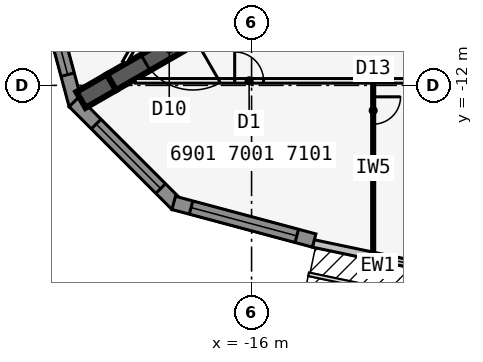
"""IFC4 building model, lengths in metres.
Left out: names, types, materials, properties, quantities, classifications, styles, units other than length and angle.
Written with IfcOpenShell. Run it as: python <this file> out.ifc"""

import sys

from ifc_helpers import new_model, si_unit, direction, frame, frame_2d, origin, place, context, subcontext, project, spatial, polyline, rectangle, outline, extrude, element, fill, save


model = new_model("IFC4")
c1 = context("Model", 3, precision=1e-05, world=origin(), true_north=direction((0.0, 1.0)))
c2 = subcontext(c1, "Body", "Model", "MODEL_VIEW")
j1 = project(units=[si_unit("LENGTHUNIT", "METRE"), si_unit("PLANEANGLEUNIT", "RADIAN")], contexts=[c1])
p1 = place(None, origin())
s1 = spatial("IfcSite", under=j1, at=p1, CompositionType="ELEMENT")
p2 = place(p1, origin())
s2 = spatial("IfcBuilding", under=s1, at=p2, CompositionType="ELEMENT")
p3 = place(p2, frame((0.0, 0.0, 260.9)))
s3 = spatial("IfcBuildingStorey", under=s2, at=p3, CompositionType="ELEMENT", Elevation=260.9)
p4 = place(p3, frame((-16.5, -9.526, 0.0), z_axis=(0.0, 0.0, 1.0), x_axis=(-0.866031398331, -0.499989616998, 0.0)))
e1 = element("IfcWall", 1, at=p4, inside=s3, PredefinedType="SHEAR", context=c2, shape_type="SweptSolid", body=[
    extrude(rectangle(XDim=4.746, YDim=0.6, at=frame_2d((2.373, 0.0))), origin(), (0.0, 0.0, 1.0), 3.6),
])
p5 = place(p4, frame((1.65, 0.0, 0.0)))
e2 = element("IfcOpeningElement", 2, at=p5, cuts=e1, PredefinedType="OPENING", context=c2, shape_type="SweptSolid", body=[
    extrude(rectangle(XDim=1.8, YDim=2.13, at=frame_2d((0.9, 1.065))), frame((0.0, 0.31, 0.0), z_axis=(0.0, -1.0, 0.0), x_axis=(1.0, 0.0, 0.0)), (0.0, 0.0, 1.0), 0.62),
])
p6 = place(p3, frame((-20.61, -11.899, 0.0), z_axis=(0.0, 0.0, 1.0), x_axis=(-0.866009537788, -0.500027479704, 0.0)))
e3 = element("IfcWall", 3, at=p6, inside=s3, PredefinedType="SHEAR", context=c2, shape_type="SweptSolid", body=[
    extrude(rectangle(XDim=1.155, YDim=0.6, at=frame_2d((0.577, 0.0))), origin(), (0.0, 0.0, 1.0), 3.6),
])
p7 = place(p3, frame((-13.974, -17.198, 0.0), z_axis=(0.0, 0.0, 1.0), x_axis=(0.978654320409, -0.205513311355, 0.0)))
e4 = element("IfcWall", 4, at=p7, inside=s3, PredefinedType="STANDARD", context=c2, shape_type="SweptSolid", body=[
    extrude(rectangle(XDim=7.153, YDim=0.25, at=frame_2d((3.576, 0.0))), origin(), (0.0, 0.0, 1.0), 3.435),
])
p8 = place(p7, frame((2.376, 0.0, 0.45)))
e5 = element("IfcOpeningElement", 5, at=p8, cuts=e4, PredefinedType="OPENING", context=c2, shape_type="SweptSolid", body=[
    extrude(rectangle(XDim=4.2, YDim=2.6, at=frame_2d((2.1, 1.3))), frame((0.0, 0.135, 0.0), z_axis=(0.0, -1.0, 0.0), x_axis=(1.0, 0.0, 0.0)), (0.0, 0.0, 1.0), 0.27),
])
p9 = place(p3, frame((-23.02, -8.025, 0.0), z_axis=(0.0, 0.0, 1.0), x_axis=(0.25880328844, -0.965930048136, 0.0)))
e6 = element("IfcWall", 6, at=p9, inside=s3, PredefinedType="SOLIDWALL", context=c2, shape_type="SweptSolid", body=[
    extrude(outline(polyline([(4.782, 0.225), (4.722, 0.225), (4.375, 0.132), (4.351, 0.225), (0.0, 0.225), (0.0, -0.225), (4.782, -0.225), (4.782, 0.225)])), origin(), (0.0, 0.0, 1.0), 3.435),
])
p10 = place(p9, frame((0.75, 0.0, 0.45)))
e7 = element("IfcOpeningElement", 7, at=p10, cuts=e6, PredefinedType="OPENING", context=c2, shape_type="SweptSolid", body=[
    extrude(rectangle(XDim=3.0, YDim=2.6, at=frame_2d((1.5, 1.3))), frame((0.0, 0.235, 0.0), z_axis=(0.0, -1.0, 0.0), x_axis=(1.0, 0.0, 0.0)), (0.0, 0.0, 1.0), 0.47),
])
p11 = place(p3, frame((-21.841, -12.542, 0.0), z_axis=(0.0, 0.0, 1.0), x_axis=(0.707081252484, -0.707132308968, 0.0)))
e8 = element("IfcWall", 8, at=p11, inside=s3, PredefinedType="SOLIDWALL", context=c2, shape_type="SweptSolid", body=[
    extrude(outline(polyline([(4.782, 0.225), (0.431, 0.225), (0.406, 0.132), (0.059, 0.225), (0.0, 0.225), (0.0, -0.225), (4.782, -0.225), (4.782, 0.225)])), origin(), (0.0, 0.0, 1.0), 3.435),
])
p12 = place(p11, frame((1.031, 0.0, 0.45)))
e9 = element("IfcOpeningElement", 9, at=p12, cuts=e8, PredefinedType="OPENING", context=c2, shape_type="SweptSolid", body=[
    extrude(rectangle(XDim=3.0, YDim=2.6, at=frame_2d((1.5, 1.3))), frame((0.0, 0.235, 0.0), z_axis=(0.0, -1.0, 0.0), x_axis=(1.0, 0.0, 0.0)), (0.0, 0.0, 1.0), 0.47),
])
p13 = place(p3, frame((-18.561, -15.865, 0.0), z_axis=(0.0, 0.0, 1.0), x_axis=(0.965913862671, -0.258863689806, 0.0)))
e10 = element("IfcWall", 10, at=p13, inside=s3, PredefinedType="SOLIDWALL", context=c2, shape_type="SweptSolid", body=[
    extrude(rectangle(XDim=4.782, YDim=0.45, at=frame_2d((2.391, 0.0))), origin(), (0.0, 0.0, 1.0), 3.435),
])
p14 = place(p13, frame((0.591, 0.0, 0.45)))
e11 = element("IfcOpeningElement", 11, at=p14, cuts=e10, PredefinedType="OPENING", context=c2, shape_type="SweptSolid", body=[
    extrude(rectangle(XDim=3.6, YDim=2.6, at=frame_2d((1.8, 1.3))), frame((0.0, 0.235, 0.0), z_axis=(0.0, -1.0, 0.0), x_axis=(1.0, 0.0, 0.0)), (0.0, 0.0, 1.0), 0.47),
])
p15 = place(p3, frame((-19.827, -11.851, 0.0), z_axis=(0.0, 0.0, 1.0), x_axis=(1.0, 0.0, 0.0)))
e12 = element("IfcWall", 12, at=p15, inside=s3, PredefinedType="PARTITIONING", context=c2, shape_type="SweptSolid", body=[
    extrude(rectangle(XDim=39.654, YDim=0.15, at=frame_2d((19.827, 0.0))), origin(), (0.0, 0.0, 1.0), 3.435),
])
p16 = place(p15, frame((3.272, 0.0, 0.0)))
e13 = element("IfcOpeningElement", 13, at=p16, cuts=e12, PredefinedType="OPENING", context=c2, shape_type="SweptSolid", body=[
    extrude(rectangle(XDim=0.95, YDim=2.13, at=frame_2d((0.475, 1.065))), frame((0.0, 0.085, 0.0), z_axis=(0.0, -1.0, 0.0), x_axis=(1.0, 0.0, 0.0)), (0.0, 0.0, 1.0), 0.17),
])
p17 = place(p15, frame((17.052, 0.0, 0.0)))
e14 = element("IfcOpeningElement", 14, at=p17, cuts=e12, PredefinedType="OPENING", context=c2, shape_type="SweptSolid", body=[
    extrude(rectangle(XDim=0.95, YDim=2.13, at=frame_2d((0.475, 1.065))), frame((0.0, 0.085, 0.0), z_axis=(0.0, -1.0, 0.0), x_axis=(1.0, 0.0, 0.0)), (0.0, 0.0, 1.0), 0.17),
])
p18 = place(p15, frame((23.052, 0.0, 0.0)))
e15 = element("IfcOpeningElement", 15, at=p18, cuts=e12, PredefinedType="OPENING", context=c2, shape_type="SweptSolid", body=[
    extrude(rectangle(XDim=0.95, YDim=2.13, at=frame_2d((0.475, 1.065))), frame((0.0, 0.085, 0.0), z_axis=(0.0, -1.0, 0.0), x_axis=(1.0, 0.0, 0.0)), (0.0, 0.0, 1.0), 0.17),
])
p19 = place(p15, frame((35.432, 0.0, 0.0)))
e16 = element("IfcOpeningElement", 16, at=p19, cuts=e12, PredefinedType="OPENING", context=c2, shape_type="SweptSolid", body=[
    extrude(rectangle(XDim=0.95, YDim=2.13, at=frame_2d((0.475, 1.065))), frame((0.0, 0.085, 0.0), z_axis=(0.0, -1.0, 0.0), x_axis=(1.0, 0.0, 0.0)), (0.0, 0.0, 1.0), 0.17),
])
p20 = place(p3, frame((-12.0, -11.926, 0.0), z_axis=(0.0, 0.0, 1.0), x_axis=(0.0, -1.0, 0.0)))
e17 = element("IfcWall", 17, at=p20, inside=s3, PredefinedType="PARTITIONING", context=c2, shape_type="SweptSolid", body=[
    extrude(rectangle(XDim=5.559, YDim=0.1, at=frame_2d((2.779, 0.0))), origin(), (0.0, 0.0, 1.0), 2.823),
])
p21 = place(p20, frame((0.45, 0.0, 0.0)))
e18 = element("IfcOpeningElement", 18, at=p21, cuts=e17, PredefinedType="OPENING", context=c2, shape_type="SweptSolid", body=[
    extrude(rectangle(XDim=0.9, YDim=2.13, at=frame_2d((0.45, 1.065))), frame((0.0, 0.06, 0.0), z_axis=(0.0, -1.0, 0.0), x_axis=(1.0, 0.0, 0.0)), (0.0, 0.0, 1.0), 0.12),
])
p22 = place(p3, frame((-13.263, 0.729, 0.0), z_axis=(0.0, 0.0, 1.0), x_axis=(-0.500001642027, -0.866024455758, 0.0)))
e19 = element("IfcWall", 19, at=p22, inside=s3, PredefinedType="PARTITIONING", context=c2, shape_type="SweptSolid", body=[
    extrude(rectangle(XDim=13.827, YDim=0.15, at=frame_2d((6.914, 0.0))), origin(), (0.0, 0.0, 1.0), 3.435),
])
p23 = place(p22, frame((3.225, 0.0, 0.0)))
e20 = element("IfcOpeningElement", 20, at=p23, cuts=e19, PredefinedType="OPENING", context=c2, shape_type="SweptSolid", body=[
    extrude(rectangle(XDim=0.95, YDim=2.13, at=frame_2d((0.475, 1.065))), frame((0.0, 0.085, 0.0), z_axis=(0.0, -1.0, 0.0), x_axis=(1.0, 0.0, 0.0)), (0.0, 0.0, 1.0), 0.17),
])
p24 = place(p22, frame((9.225, 0.0, 0.0)))
e21 = element("IfcOpeningElement", 21, at=p24, cuts=e19, PredefinedType="OPENING", context=c2, shape_type="SweptSolid", body=[
    extrude(rectangle(XDim=0.95, YDim=2.13, at=frame_2d((0.475, 1.065))), frame((0.0, 0.085, 0.0), z_axis=(0.0, -1.0, 0.0), x_axis=(1.0, 0.0, 0.0)), (0.0, 0.0, 1.0), 0.17),
])
p25 = place(p8, origin())
e22 = element("IfcWindow", 22, at=p25, inside=s3, PartitioningType="SINGLE_PANEL", PredefinedType="WINDOW", context=c2, shape_type="SweptSolid", body=[
    extrude(rectangle(XDim=4.2, YDim=2.6, at=frame_2d((2.1, 1.3))), frame((0.0, 0.03, 0.0), z_axis=(0.0, -1.0, 0.0), x_axis=(1.0, 0.0, 0.0)), (0.0, 0.0, 1.0), 0.06),
])
fill(e5, e22)
p26 = place(p10, origin())
e23 = element("IfcWindow", 23, at=p26, inside=s3, PartitioningType="SINGLE_PANEL", PredefinedType="WINDOW", context=c2, shape_type="SweptSolid", body=[
    extrude(rectangle(XDim=3.0, YDim=2.6, at=frame_2d((1.5, 1.3))), frame((0.0, 0.03, 0.0), z_axis=(0.0, -1.0, 0.0), x_axis=(1.0, 0.0, 0.0)), (0.0, 0.0, 1.0), 0.06),
])
fill(e7, e23)
p27 = place(p12, origin())
e24 = element("IfcWindow", 24, at=p27, inside=s3, PartitioningType="SINGLE_PANEL", PredefinedType="WINDOW", context=c2, shape_type="SweptSolid", body=[
    extrude(rectangle(XDim=3.0, YDim=2.6, at=frame_2d((1.5, 1.3))), frame((0.0, 0.03, 0.0), z_axis=(0.0, -1.0, 0.0), x_axis=(1.0, 0.0, 0.0)), (0.0, 0.0, 1.0), 0.06),
])
fill(e9, e24)
p28 = place(p14, origin())
e25 = element("IfcWindow", 25, at=p28, inside=s3, PartitioningType="SINGLE_PANEL", PredefinedType="WINDOW", context=c2, shape_type="SweptSolid", body=[
    extrude(rectangle(XDim=3.6, YDim=2.6, at=frame_2d((1.8, 1.3))), frame((0.0, 0.03, 0.0), z_axis=(0.0, -1.0, 0.0), x_axis=(1.0, 0.0, 0.0)), (0.0, 0.0, 1.0), 0.06),
])
fill(e11, e25)
p29 = place(p21, origin())
e26 = element("IfcDoor", 26, at=p29, inside=s3, OperationType="SINGLE_SWING_LEFT", PredefinedType="DOOR", context=c2, shape_type="SweptSolid", body=[
    extrude(rectangle(XDim=0.9, YDim=2.13, at=frame_2d((0.45, 1.065))), frame((0.0, 0.025, 0.0), z_axis=(0.0, -1.0, 0.0), x_axis=(1.0, 0.0, 0.0)), (0.0, 0.0, 1.0), 0.05),
])
fill(e18, e26)
p30 = place(p16, origin())
e27 = element("IfcDoor", 27, at=p30, inside=s3, OperationType="SINGLE_SWING_LEFT", PredefinedType="DOOR", context=c2, shape_type="SweptSolid", body=[
    extrude(rectangle(XDim=0.95, YDim=2.13, at=frame_2d((0.475, 1.065))), frame((0.0, 0.025, 0.0), z_axis=(0.0, -1.0, 0.0), x_axis=(1.0, 0.0, 0.0)), (0.0, 0.0, 1.0), 0.05),
])
fill(e13, e27)
p31 = place(p5, origin())
e28 = element("IfcDoor", 28, at=p31, inside=s3, OperationType="DOUBLE_DOOR_DOUBLE_SWING", PredefinedType="DOOR", context=c2, shape_type="SweptSolid", body=[
    extrude(rectangle(XDim=1.8, YDim=2.13, at=frame_2d((0.9, 1.065))), frame((0.0, 0.025, 0.0), z_axis=(0.0, -1.0, 0.0), x_axis=(1.0, 0.0, 0.0)), (0.0, 0.0, 1.0), 0.05),
])
fill(e2, e28)
save(model, sys.argv[1])
